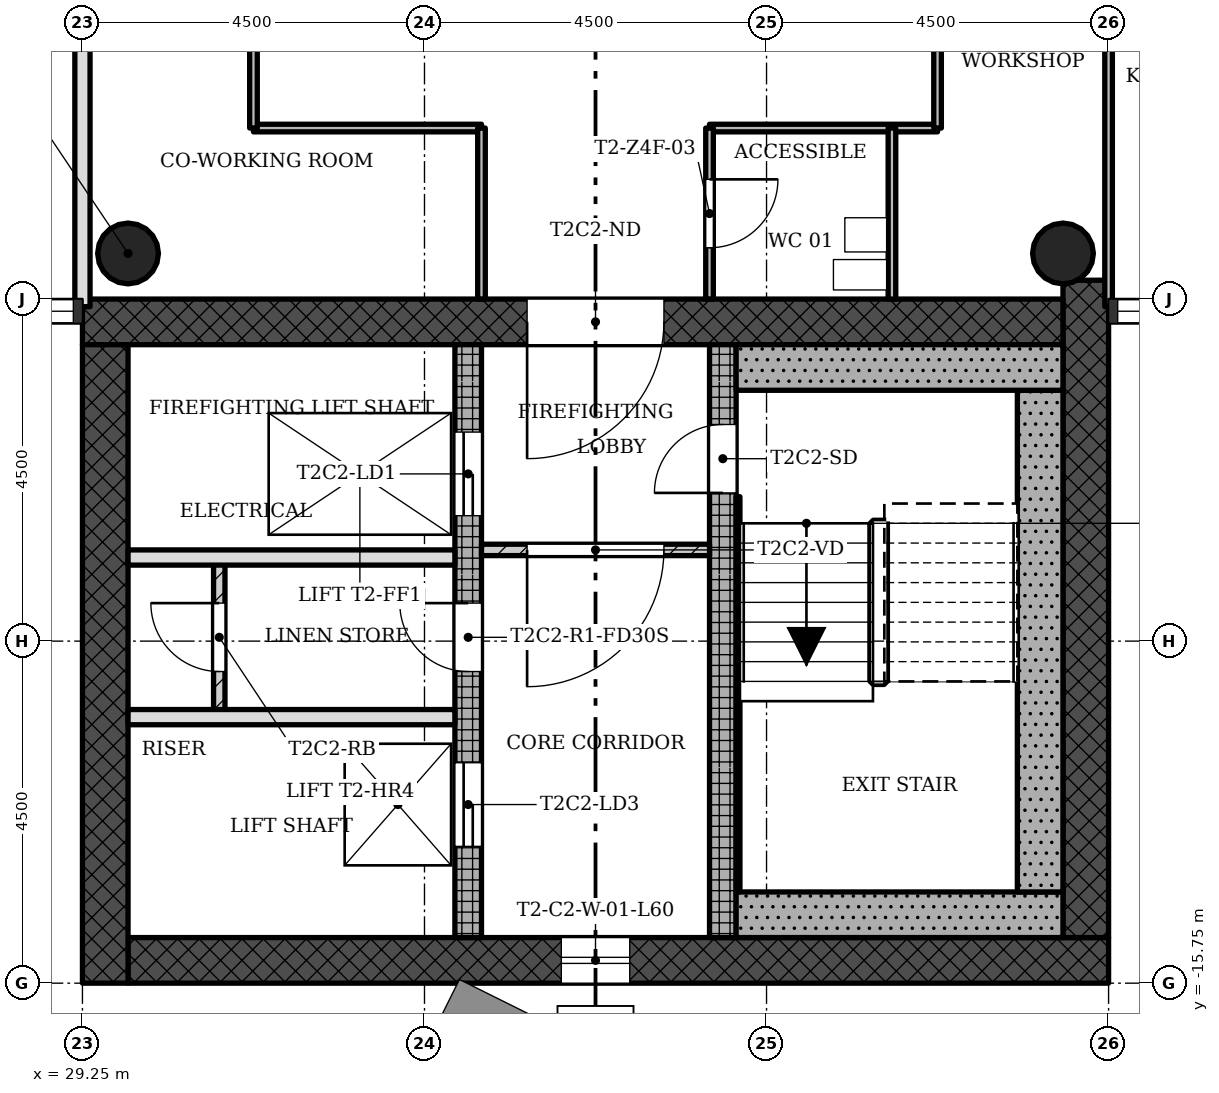
"""IFC4 building model, lengths in metres.
Left out: names, types, materials, properties, quantities, classifications, styles, units other than length and angle.
Written with IfcOpenShell. Run it as: python <this file> out.ifc"""

import sys

from ifc_helpers import new_model, si_unit, direction, frame, frame_2d, origin, origin_2d, place, context, subcontext, project, spatial, rectangle, hollow_circle, extrude, element, fill, save


model = new_model("IFC4")
c1 = context("Model", 3, precision=1e-05, world=origin(), true_north=direction((0.0, 1.0)))
c2 = subcontext(c1, "Body", "Model", "MODEL_VIEW")
j1 = project(units=[si_unit("LENGTHUNIT", "METRE"), si_unit("PLANEANGLEUNIT", "RADIAN")], contexts=[c1])
p1 = place(None, origin())
s1 = spatial("IfcSite", under=j1, at=p1, CompositionType="ELEMENT")
p2 = place(p1, origin())
s2 = spatial("IfcBuilding", under=s1, at=p2, CompositionType="ELEMENT")
p3 = place(p2, frame((0.0, 0.0, 216.4)))
s3 = spatial("IfcBuildingStorey", under=s2, at=p3, CompositionType="ELEMENT", Elevation=216.4)
p4 = place(p3, frame((29.85, -15.45, 0.0), z_axis=(0.0, 0.0, 1.0), x_axis=(1.0, 0.0, 0.0)))
e1 = element("IfcWall", 1, at=p4, inside=s3, PredefinedType="SHEAR", context=c2, shape_type="SweptSolid", body=[
    extrude(rectangle(XDim=12.9, YDim=0.6, at=frame_2d((6.45, 0.0))), origin(), (0.0, 0.0, 1.0), 3.4),
])
p5 = place(p4, frame((5.7, 0.0, 0.45)))
e2 = element("IfcOpeningElement", 2, at=p5, cuts=e1, PredefinedType="OPENING", context=c2, shape_type="SweptSolid", body=[
    extrude(rectangle(XDim=0.9, YDim=2.4, at=frame_2d((0.45, 1.2))), frame((0.0, 0.31, 0.0), z_axis=(0.0, -1.0, 0.0), x_axis=(1.0, 0.0, 0.0)), (0.0, 0.0, 1.0), 0.62),
])
p6 = place(p3, frame((42.45, -15.15, 0.0), z_axis=(0.0, 0.0, 1.0), x_axis=(0.0, 1.0, 0.0)))
e3 = element("IfcWall", 3, at=p6, inside=s3, PredefinedType="SHEAR", context=c2, shape_type="SweptSolid", body=[
    extrude(rectangle(XDim=8.648, YDim=0.6, at=frame_2d((4.324, 0.0))), origin(), (0.0, 0.0, 1.0), 3.4),
])
p7 = place(p3, frame((42.15, -7.05, 0.0), z_axis=(0.0, 0.0, 1.0), x_axis=(-1.0, 0.0, 0.0)))
e4 = element("IfcWall", 4, at=p7, inside=s3, PredefinedType="SHEAR", context=c2, shape_type="SweptSolid", body=[
    extrude(rectangle(XDim=12.9, YDim=0.6, at=frame_2d((6.45, 0.0))), origin(), (0.0, 0.0, 1.0), 3.4),
])
p8 = place(p7, frame((5.25, 0.0, 0.0)))
e5 = element("IfcOpeningElement", 5, at=p8, cuts=e4, PredefinedType="OPENING", context=c2, shape_type="SweptSolid", body=[
    extrude(rectangle(XDim=1.8, YDim=2.1, at=frame_2d((0.9, 1.05))), frame((0.0, 0.31, 0.0), z_axis=(0.0, -1.0, 0.0), x_axis=(1.0, 0.0, 0.0)), (0.0, 0.0, 1.0), 0.62),
])
p9 = place(p3, frame((29.55, -7.35, 0.0), z_axis=(0.0, 0.0, 1.0), x_axis=(0.0, -1.0, 0.0)))
e6 = element("IfcWall", 6, at=p9, inside=s3, PredefinedType="SHEAR", context=c2, shape_type="SweptSolid", body=[
    extrude(rectangle(XDim=8.4, YDim=0.6, at=frame_2d((4.2, 0.0))), origin(), (0.0, 0.0, 1.0), 3.4),
])
p10 = place(p3, frame((34.325, -15.15, 0.0), z_axis=(0.0, 0.0, 1.0), x_axis=(0.0, 1.0, 0.0)))
e7 = element("IfcWall", 7, at=p10, inside=s3, PredefinedType="SHEAR", context=c2, shape_type="SweptSolid", body=[
    extrude(rectangle(XDim=7.8, YDim=0.35, at=frame_2d((3.9, 0.0))), origin(), (0.0, 0.0, 1.0), 3.4),
])
p11 = place(p10, frame((5.55, 0.0, 0.0)))
e8 = element("IfcOpeningElement", 8, at=p11, cuts=e7, PredefinedType="OPENING", context=c2, shape_type="SweptSolid", body=[
    extrude(rectangle(XDim=1.1, YDim=2.1, at=frame_2d((0.55, 1.05))), frame((0.0, 0.185, 0.0), z_axis=(0.0, -1.0, 0.0), x_axis=(1.0, 0.0, 0.0)), (0.0, 0.0, 1.0), 0.37),
])
p12 = place(p10, frame((1.2, 0.0, 0.0)))
e9 = element("IfcOpeningElement", 9, at=p12, cuts=e7, PredefinedType="OPENING", context=c2, shape_type="SweptSolid", body=[
    extrude(rectangle(XDim=1.1, YDim=2.1, at=frame_2d((0.55, 1.05))), frame((0.0, 0.185, 0.0), z_axis=(0.0, -1.0, 0.0), x_axis=(1.0, 0.0, 0.0)), (0.0, 0.0, 1.0), 0.37),
])
p13 = place(p10, frame((3.5, 0.0, 0.0)))
e10 = element("IfcOpeningElement", 10, at=p13, cuts=e7, PredefinedType="OPENING", context=c2, shape_type="SweptSolid", body=[
    extrude(rectangle(XDim=0.9, YDim=2.1, at=frame_2d((0.45, 1.05))), frame((0.0, 0.185, 0.0), z_axis=(0.0, -1.0, 0.0), x_axis=(1.0, 0.0, 0.0)), (0.0, 0.0, 1.0), 0.37),
])
p14 = place(p3, frame((37.675, -15.15, 0.0), z_axis=(0.0, 0.0, 1.0), x_axis=(0.0, 1.0, 0.0)))
e11 = element("IfcWall", 11, at=p14, inside=s3, PredefinedType="SHEAR", context=c2, shape_type="SweptSolid", body=[
    extrude(rectangle(XDim=7.8, YDim=0.35, at=frame_2d((3.9, 0.0))), origin(), (0.0, 0.0, 1.0), 3.4),
])
p15 = place(p14, frame((5.85, 0.0, 0.0)))
e12 = element("IfcOpeningElement", 12, at=p15, cuts=e11, PredefinedType="OPENING", context=c2, shape_type="SweptSolid", body=[
    extrude(rectangle(XDim=0.9, YDim=2.1, at=frame_2d((0.45, 1.05))), frame((0.0, 0.185, 0.0), z_axis=(0.0, -1.0, 0.0), x_axis=(1.0, 0.0, 0.0)), (0.0, 0.0, 1.0), 0.37),
])
for number, where, z_axis, x_axis in (
    (13, (42.15, -6.15, 0.0), (0.0, 0.0, 1.0), (1.0, 0.0, 0.0)),
    (14, (29.85, -6.15, 0.0), (0.0, 0.0, 1.0), (1.0, 0.0, 0.0)),
):
    element("IfcColumn", number, at=place(p3, frame(where, z_axis=z_axis, x_axis=x_axis)), inside=s3, PredefinedType="COLUMN", context=c2, shape_type="SweptSolid", body=[
        extrude(hollow_circle(Radius=0.4, WallThickness=0.028, at=origin_2d()), origin(), (0.0, 0.0, 1.0), 3.4),
    ])
p16 = place(p3, frame((34.5, -10.05, 0.0), z_axis=(0.0, 0.0, 1.0), x_axis=(1.0, 0.0, 0.0)))
e15 = element("IfcWall", 15, at=p16, inside=s3, PredefinedType="PARTITIONING", context=c2, shape_type="SweptSolid", body=[
    extrude(rectangle(XDim=3.0, YDim=0.15, at=frame_2d((1.5, 0.0))), origin(), (0.0, 0.0, 1.0), 3.0),
])
p17 = place(p16, frame((0.6, 0.0, 0.0)))
e16 = element("IfcOpeningElement", 16, at=p17, cuts=e15, PredefinedType="OPENING", context=c2, shape_type="SweptSolid", body=[
    extrude(rectangle(XDim=1.8, YDim=2.1, at=frame_2d((0.9, 1.05))), frame((0.0, 0.085, 0.0), z_axis=(0.0, -1.0, 0.0), x_axis=(1.0, 0.0, 0.0)), (0.0, 0.0, 1.0), 0.17),
])
for number, where, z_axis, x_axis in (
    (17, (29.85, -12.25, 0.0), (0.0, 0.0, 1.0), (1.0, 0.0, 0.0)),
    (18, (29.85, -10.15, 0.0), (0.0, 0.0, 1.0), (1.0, 0.0, 0.0)),
):
    element("IfcWall", number, at=place(p3, frame(where, z_axis=z_axis, x_axis=x_axis)), inside=s3, PredefinedType="SOLIDWALL", context=c2, shape_type="SweptSolid", body=[
        extrude(rectangle(XDim=4.3, YDim=0.2, at=frame_2d((2.15, 0.0))), origin(), (0.0, 0.0, 1.0), 3.0),
    ])
p18 = place(p3, frame((31.05, -10.15, 0.0), z_axis=(0.0, 0.0, 1.0), x_axis=(0.0, -1.0, 0.0)))
e19 = element("IfcWall", 19, at=p18, inside=s3, PredefinedType="PARTITIONING", context=c2, shape_type="SweptSolid", body=[
    extrude(rectangle(XDim=2.1, YDim=0.15, at=frame_2d((1.05, 0.0))), origin(), (0.0, 0.0, 1.0), 3.0),
])
p19 = place(p18, frame((0.6, 0.0, 0.0)))
e20 = element("IfcOpeningElement", 20, at=p19, cuts=e19, PredefinedType="OPENING", context=c2, shape_type="SweptSolid", body=[
    extrude(rectangle(XDim=0.9, YDim=2.1, at=frame_2d((0.45, 1.05))), frame((0.0, 0.085, 0.0), z_axis=(0.0, -1.0, 0.0), x_axis=(1.0, 0.0, 0.0)), (0.0, 0.0, 1.0), 0.17),
])
for number, where, z_axis, x_axis in (
    (21, (40.5, -4.5, 0.0), (0.0, 0.0, 1.0), (-1.0, 0.0, 0.0)),
    (22, (34.5, -4.5, 0.0), (0.0, 0.0, 1.0), (-1.0, 0.0, 0.0)),
):
    element("IfcWall", number, at=place(p3, frame(where, z_axis=z_axis, x_axis=x_axis)), inside=s3, PredefinedType="PARTITIONING", context=c2, shape_type="SweptSolid", body=[
        extrude(rectangle(XDim=3.0, YDim=0.1, at=frame_2d((1.5, 0.0))), origin(), (0.0, 0.0, 1.0), 3.0),
    ])
p20 = place(p3, frame((42.75, -6.85, 0.0), z_axis=(0.0, 0.0, 1.0), x_axis=(0.0, 1.0, 0.0)))
e23 = element("IfcWall", 23, at=p20, inside=s3, PredefinedType="PARTITIONING", context=c2, shape_type="SweptSolid", body=[
    extrude(rectangle(XDim=5.95, YDim=0.1, at=frame_2d((2.975, 0.0))), origin(), (0.0, 0.0, 1.0), 3.0),
])
p21 = place(p3, frame((40.5, -4.5, 0.0), z_axis=(0.0, 0.0, 1.0), x_axis=(0.0, 1.0, 0.0)))
e24 = element("IfcWall", 24, at=p21, inside=s3, PredefinedType="PARTITIONING", context=c2, shape_type="SweptSolid", body=[
    extrude(rectangle(XDim=3.6, YDim=0.1, at=frame_2d((1.8, 0.0))), origin(), (0.0, 0.0, 1.0), 3.0),
])
p22 = place(p21, frame((1.35, 0.0, 0.0)))
e25 = element("IfcOpeningElement", 25, at=p22, cuts=e24, PredefinedType="OPENING", context=c2, shape_type="SweptSolid", body=[
    extrude(rectangle(XDim=0.9, YDim=2.1, at=frame_2d((0.45, 1.05))), frame((0.0, 0.06, 0.0), z_axis=(0.0, -1.0, 0.0), x_axis=(1.0, 0.0, 0.0)), (0.0, 0.0, 1.0), 0.12),
])
p23 = place(p3, frame((39.9, -6.75, 0.0), z_axis=(0.0, 0.0, 1.0), x_axis=(0.0, 1.0, 0.0)))
e26 = element("IfcWall", 26, at=p23, inside=s3, PredefinedType="PARTITIONING", context=c2, shape_type="SweptSolid", body=[
    extrude(rectangle(XDim=2.25, YDim=0.1, at=frame_2d((1.125, 0.0))), origin(), (0.0, 0.0, 1.0), 3.0),
])
p24 = place(p3, frame((37.5, -6.75, 0.0), z_axis=(0.0, 0.0, 1.0), x_axis=(0.0, 1.0, 0.0)))
e27 = element("IfcWall", 27, at=p24, inside=s3, PredefinedType="PARTITIONING", context=c2, shape_type="SweptSolid", body=[
    extrude(rectangle(XDim=2.25, YDim=0.1, at=frame_2d((1.125, 0.0))), origin(), (0.0, 0.0, 1.0), 3.0),
])
p25 = place(p24, frame((0.675, 0.0, 0.0)))
e28 = element("IfcOpeningElement", 28, at=p25, cuts=e27, PredefinedType="OPENING", context=c2, shape_type="SweptSolid", body=[
    extrude(rectangle(XDim=0.9, YDim=2.1, at=frame_2d((0.45, 1.05))), frame((0.0, 0.06, 0.0), z_axis=(0.0, -1.0, 0.0), x_axis=(1.0, 0.0, 0.0)), (0.0, 0.0, 1.0), 0.12),
])
p26 = place(p3, frame((34.5, -6.75, 0.0), z_axis=(0.0, 0.0, 1.0), x_axis=(0.0, 1.0, 0.0)))
e29 = element("IfcWall", 29, at=p26, inside=s3, PredefinedType="PARTITIONING", context=c2, shape_type="SweptSolid", body=[
    extrude(rectangle(XDim=2.25, YDim=0.1, at=frame_2d((1.125, 0.0))), origin(), (0.0, 0.0, 1.0), 3.0),
])
p27 = place(p3, frame((31.5, -4.5, 0.0), z_axis=(0.0, 0.0, 1.0), x_axis=(0.0, 1.0, 0.0)))
e30 = element("IfcWall", 30, at=p27, inside=s3, PredefinedType="PARTITIONING", context=c2, shape_type="SweptSolid", body=[
    extrude(rectangle(XDim=3.6, YDim=0.1, at=frame_2d((1.8, 0.0))), origin(), (0.0, 0.0, 1.0), 3.0),
])
p28 = place(p27, frame((1.35, 0.0, 0.0)))
e31 = element("IfcOpeningElement", 31, at=p28, cuts=e30, PredefinedType="OPENING", context=c2, shape_type="SweptSolid", body=[
    extrude(rectangle(XDim=0.9, YDim=2.1, at=frame_2d((0.45, 1.05))), frame((0.0, 0.06, 0.0), z_axis=(0.0, -1.0, 0.0), x_axis=(1.0, 0.0, 0.0)), (0.0, 0.0, 1.0), 0.12),
])
p29 = place(p3, frame((29.25, -6.85, 0.0), z_axis=(0.0, 0.0, 1.0), x_axis=(0.0, 1.0, 0.0)))
e32 = element("IfcWall", 32, at=p29, inside=s3, PredefinedType="SOLIDWALL", context=c2, shape_type="SweptSolid", body=[
    extrude(rectangle(XDim=13.7, YDim=0.2, at=frame_2d((6.85, 0.0))), origin(), (0.0, 0.0, 1.0), 3.0),
])
p30 = place(p29, frame((6.4, 0.0, 0.0)))
e33 = element("IfcOpeningElement", 33, at=p30, cuts=e32, PredefinedType="OPENING", context=c2, shape_type="SweptSolid", body=[
    extrude(rectangle(XDim=0.9, YDim=2.1, at=frame_2d((0.45, 1.05))), frame((0.0, 0.11, 0.0), z_axis=(0.0, -1.0, 0.0), x_axis=(1.0, 0.0, 0.0)), (0.0, 0.0, 1.0), 0.22),
])
p31 = place(p3, frame((37.85, -14.85, 0.0), z_axis=(0.0, 0.0, 1.0), x_axis=(1.0, 0.0, 0.0)))
e34 = element("IfcWall", 34, at=p31, inside=s3, PredefinedType="SHEAR", context=c2, shape_type="SweptSolid", body=[
    extrude(rectangle(XDim=4.3, YDim=0.6, at=frame_2d((2.15, 0.0))), origin(), (0.0, 0.0, 1.0), 3.4),
])
p32 = place(p3, frame((41.85, -7.95, 0.0), z_axis=(0.0, 0.0, 1.0), x_axis=(0.0, -1.0, 0.0)))
e35 = element("IfcWall", 35, at=p32, inside=s3, PredefinedType="SHEAR", context=c2, shape_type="SweptSolid", body=[
    extrude(rectangle(XDim=6.6, YDim=0.6, at=frame_2d((3.3, 0.0))), origin(), (0.0, 0.0, 1.0), 3.4),
])
p33 = place(p3, frame((37.85, -7.65, 0.0), z_axis=(0.0, 0.0, 1.0), x_axis=(1.0, 0.0, 0.0)))
e36 = element("IfcWall", 36, at=p33, inside=s3, PredefinedType="SHEAR", context=c2, shape_type="SweptSolid", body=[
    extrude(rectangle(XDim=4.3, YDim=0.6, at=frame_2d((2.15, 0.0))), origin(), (0.0, 0.0, 1.0), 3.4),
])
p34 = place(p3, frame((37.875, -9.35, 0.0), z_axis=(0.0, 0.0, 1.0), x_axis=(0.0, -1.0, 0.0)))
e37 = element("IfcWall", 37, at=p34, inside=s3, PredefinedType="SHEAR", context=c2, shape_type="SweptSolid", body=[
    extrude(rectangle(XDim=5.2, YDim=0.05, at=frame_2d((2.6, 0.0))), origin(), (0.0, 0.0, 1.0), 3.4),
])
p35 = place(p5, origin())
e38 = element("IfcWindow", 38, at=p35, inside=s3, PartitioningType="SINGLE_PANEL", PredefinedType="WINDOW", context=c2, shape_type="SweptSolid", body=[
    extrude(rectangle(XDim=0.9, YDim=2.4, at=frame_2d((0.45, 1.2))), frame((0.0, 0.03, 0.0), z_axis=(0.0, -1.0, 0.0), x_axis=(1.0, 0.0, 0.0)), (0.0, 0.0, 1.0), 0.06),
])
fill(e2, e38)
p36 = place(p17, origin())
e39 = element("IfcDoor", 39, at=p36, inside=s3, OperationType="SINGLE_SWING_LEFT", PredefinedType="DOOR", context=c2, shape_type="SweptSolid", body=[
    extrude(rectangle(XDim=1.8, YDim=2.1, at=frame_2d((0.9, 1.05))), frame((0.0, 0.025, 0.0), z_axis=(0.0, -1.0, 0.0), x_axis=(1.0, 0.0, 0.0)), (0.0, 0.0, 1.0), 0.05),
])
fill(e16, e39)
p37 = place(p19, origin())
e40 = element("IfcDoor", 40, at=p37, inside=s3, OperationType="SINGLE_SWING_LEFT", PredefinedType="DOOR", context=c2, shape_type="SweptSolid", body=[
    extrude(rectangle(XDim=0.9, YDim=2.1, at=frame_2d((0.45, 1.05))), frame((0.0, 0.025, 0.0), z_axis=(0.0, -1.0, 0.0), x_axis=(1.0, 0.0, 0.0)), (0.0, 0.0, 1.0), 0.05),
])
fill(e20, e40)
p38 = place(p25, origin())
e41 = element("IfcDoor", 41, at=p38, inside=s3, OperationType="SINGLE_SWING_RIGHT", PredefinedType="DOOR", context=c2, shape_type="SweptSolid", body=[
    extrude(rectangle(XDim=0.9, YDim=2.1, at=frame_2d((0.45, 1.05))), frame((0.0, 0.025, 0.0), z_axis=(0.0, -1.0, 0.0), x_axis=(1.0, 0.0, 0.0)), (0.0, 0.0, 1.0), 0.05),
])
fill(e28, e41)
p39 = place(p15, origin())
e42 = element("IfcDoor", 42, at=p39, inside=s3, OperationType="SINGLE_SWING_RIGHT", PredefinedType="DOOR", context=c2, shape_type="SweptSolid", body=[
    extrude(rectangle(XDim=0.9, YDim=2.1, at=frame_2d((0.45, 1.05))), frame((0.0, 0.025, 0.0), z_axis=(0.0, -1.0, 0.0), x_axis=(1.0, 0.0, 0.0)), (0.0, 0.0, 1.0), 0.05),
])
fill(e12, e42)
p40 = place(p11, origin())
e43 = element("IfcDoor", 43, at=p40, inside=s3, OperationType="SLIDING_TO_LEFT", PredefinedType="DOOR", context=c2, shape_type="SweptSolid", body=[
    extrude(rectangle(XDim=1.1, YDim=2.1, at=frame_2d((0.55, 1.05))), frame((0.0, 0.025, 0.0), z_axis=(0.0, -1.0, 0.0), x_axis=(1.0, 0.0, 0.0)), (0.0, 0.0, 1.0), 0.05),
])
fill(e8, e43)
p41 = place(p12, origin())
e44 = element("IfcDoor", 44, at=p41, inside=s3, OperationType="SLIDING_TO_LEFT", PredefinedType="DOOR", context=c2, shape_type="SweptSolid", body=[
    extrude(rectangle(XDim=1.1, YDim=2.1, at=frame_2d((0.55, 1.05))), frame((0.0, 0.025, 0.0), z_axis=(0.0, -1.0, 0.0), x_axis=(1.0, 0.0, 0.0)), (0.0, 0.0, 1.0), 0.05),
])
fill(e9, e44)
p42 = place(p13, origin())
e45 = element("IfcDoor", 45, at=p42, inside=s3, OperationType="SINGLE_SWING_LEFT", PredefinedType="DOOR", context=c2, shape_type="SweptSolid", body=[
    extrude(rectangle(XDim=0.9, YDim=2.1, at=frame_2d((0.45, 1.05))), frame((0.0, 0.025, 0.0), z_axis=(0.0, -1.0, 0.0), x_axis=(1.0, 0.0, 0.0)), (0.0, 0.0, 1.0), 0.05),
])
fill(e10, e45)
p43 = place(p8, origin())
e46 = element("IfcDoor", 46, at=p43, inside=s3, OperationType="SINGLE_SWING_LEFT", PredefinedType="DOOR", context=c2, shape_type="SweptSolid", body=[
    extrude(rectangle(XDim=1.8, YDim=2.1, at=frame_2d((0.9, 1.05))), frame((0.0, 0.025, 0.0), z_axis=(0.0, -1.0, 0.0), x_axis=(1.0, 0.0, 0.0)), (0.0, 0.0, 1.0), 0.05),
])
fill(e5, e46)
save(model, sys.argv[1])
